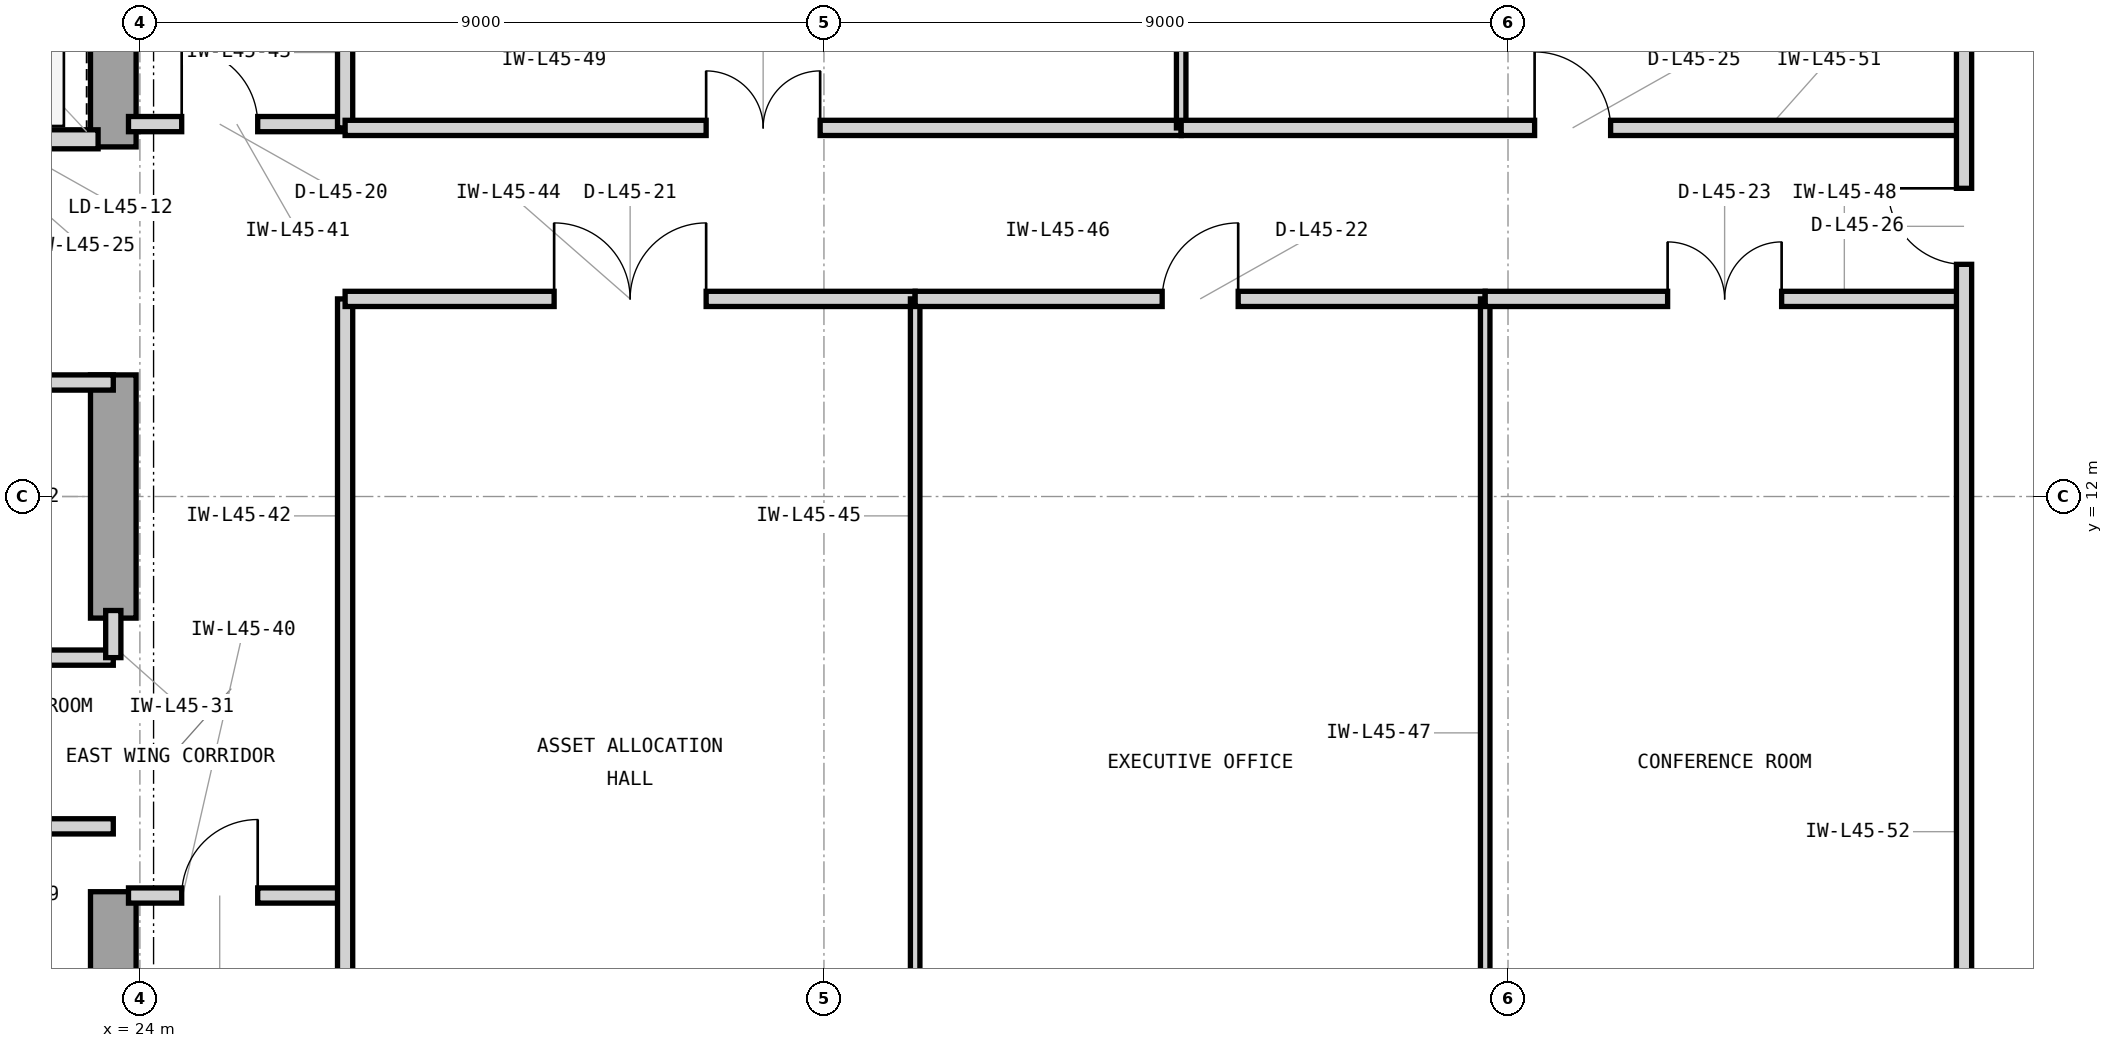
"""IFC4 building model, lengths in metres.
Left out: names, types, materials, properties, quantities, classifications, styles, units other than length and angle.
Written with IfcOpenShell. Run it as: python <this file> out.ifc"""

import sys

from ifc_helpers import new_model, si_unit, direction, frame, frame_2d, origin, place, context, subcontext, project, spatial, rectangle, extrude, element, fill, save


model = new_model("IFC4")
c1 = context("Model", 3, precision=1e-05, world=origin(), true_north=direction((0.0, 1.0)))
c2 = subcontext(c1, "Body", "Model", "MODEL_VIEW")
j1 = project(units=[si_unit("LENGTHUNIT", "METRE"), si_unit("PLANEANGLEUNIT", "RADIAN")], contexts=[c1])
p1 = place(None, origin())
s1 = spatial("IfcSite", under=j1, at=p1, CompositionType="ELEMENT")
p2 = place(p1, origin())
s2 = spatial("IfcBuilding", under=s1, at=p2, CompositionType="ELEMENT")
p3 = place(p2, frame((0.0, 0.0, 187.8)))
s3 = spatial("IfcBuildingStorey", under=s2, at=p3, CompositionType="ELEMENT", Elevation=187.8)
p4 = place(p3, frame((23.65, 3.65, 0.0), z_axis=(0.0, 0.0, 1.0), x_axis=(0.0, 1.0, 0.0)))
e1 = element("IfcWall", 1, at=p4, inside=s3, PredefinedType="SHEAR", context=c2, shape_type="SweptSolid", body=[
    extrude(rectangle(XDim=3.15, YDim=0.6, at=frame_2d((1.575, 0.0))), origin(), (0.0, 0.0, 1.0), 3.9),
])
p5 = place(p3, frame((23.65, 10.4, 0.0), z_axis=(0.0, 0.0, 1.0), x_axis=(0.0, 1.0, 0.0)))
e2 = element("IfcWall", 2, at=p5, inside=s3, PredefinedType="SHEAR", context=c2, shape_type="SweptSolid", body=[
    extrude(rectangle(XDim=3.2, YDim=0.6, at=frame_2d((1.6, 0.0))), origin(), (0.0, 0.0, 1.0), 3.9),
])
p6 = place(p3, frame((23.65, 16.6, 0.0), z_axis=(0.0, 0.0, 1.0), x_axis=(0.0, 1.0, 0.0)))
e3 = element("IfcWall", 3, at=p6, inside=s3, PredefinedType="SHEAR", context=c2, shape_type="SweptSolid", body=[
    extrude(rectangle(XDim=4.05, YDim=0.6, at=frame_2d((2.025, 0.0))), origin(), (0.0, 0.0, 1.0), 3.9),
])
p7 = place(p3, frame((21.05, 16.7, 0.0), z_axis=(0.0, 0.0, 1.0), x_axis=(1.0, 0.0, 0.0)))
e4 = element("IfcWall", 4, at=p7, inside=s3, PredefinedType="PARTITIONING", context=c2, shape_type="SweptSolid", body=[
    extrude(rectangle(XDim=2.4, YDim=0.25, at=frame_2d((1.2, 0.0))), origin(), (0.0, 0.0, 1.0), 3.283),
])
p8 = place(p7, frame((0.52, 0.0, 0.0)))
e5 = element("IfcOpeningElement", 5, at=p8, cuts=e4, PredefinedType="OPENING", context=c2, shape_type="SweptSolid", body=[
    extrude(rectangle(XDim=1.15, YDim=2.25, at=frame_2d((0.575, 1.125))), frame((0.0, 0.135, 0.0), z_axis=(0.0, -1.0, 0.0), x_axis=(1.0, 0.0, 0.0)), (0.0, 0.0, 1.0), 0.27),
])
p9 = place(p3, frame((20.85, 7.66, 0.0), z_axis=(0.0, 0.0, 1.0), x_axis=(1.0, 0.0, 0.0)))
e6 = element("IfcWall", 6, at=p9, inside=s3, PredefinedType="PARTITIONING", context=c2, shape_type="SweptSolid", body=[
    extrude(rectangle(XDim=2.8, YDim=0.2, at=frame_2d((1.4, 0.0))), origin(), (0.0, 0.0, 1.0), 3.69),
])
p10 = place(p9, frame((0.95, 0.0, 0.0)))
e7 = element("IfcOpeningElement", 7, at=p10, cuts=e6, PredefinedType="OPENING", context=c2, shape_type="SweptSolid", body=[
    extrude(rectangle(XDim=0.9, YDim=2.1, at=frame_2d((0.45, 1.05))), frame((0.0, 0.11, 0.0), z_axis=(0.0, -1.0, 0.0), x_axis=(1.0, 0.0, 0.0)), (0.0, 0.0, 1.0), 0.22),
])
p11 = place(p3, frame((14.825, 9.88, 0.0), z_axis=(0.0, 0.0, 1.0), x_axis=(1.0, 0.0, 0.0)))
e8 = element("IfcWall", 8, at=p11, inside=s3, PredefinedType="PARTITIONING", context=c2, shape_type="SweptSolid", body=[
    extrude(rectangle(XDim=8.825, YDim=0.2, at=frame_2d((4.413, 0.0))), origin(), (0.0, 0.0, 1.0), 3.69),
])
p12 = place(p3, frame((23.65, 9.88, 0.0), z_axis=(0.0, 0.0, 1.0), x_axis=(0.0, 1.0, 0.0)))
e9 = element("IfcWall", 9, at=p12, inside=s3, PredefinedType="PARTITIONING", context=c2, shape_type="SweptSolid", body=[
    extrude(rectangle(XDim=0.62, YDim=0.2, at=frame_2d((0.31, 0.0))), origin(), (0.0, 0.0, 1.0), 3.69),
])
p13 = place(p3, frame((19.9, 13.5, 0.0), z_axis=(0.0, 0.0, 1.0), x_axis=(1.0, 0.0, 0.0)))
e10 = element("IfcWall", 10, at=p13, inside=s3, PredefinedType="PARTITIONING", context=c2, shape_type="SweptSolid", body=[
    extrude(rectangle(XDim=3.75, YDim=0.2, at=frame_2d((1.875, 0.0))), origin(), (0.0, 0.0, 1.0), 3.283),
])
p14 = place(p13, frame((1.4, 0.0, 0.0)))
e11 = element("IfcOpeningElement", 11, at=p14, cuts=e10, PredefinedType="OPENING", context=c2, shape_type="SweptSolid", body=[
    extrude(rectangle(XDim=0.95, YDim=2.1, at=frame_2d((0.475, 1.05))), frame((0.0, 0.11, 0.0), z_axis=(0.0, -1.0, 0.0), x_axis=(1.0, 0.0, 0.0)), (0.0, 0.0, 1.0), 0.22),
])
p15 = place(p3, frame((23.85, 6.75, 0.0), z_axis=(0.0, 0.0, 1.0), x_axis=(1.0, 0.0, 0.0)))
e12 = element("IfcWall", 12, at=p15, inside=s3, PredefinedType="PARTITIONING", context=c2, shape_type="SweptSolid", body=[
    extrude(rectangle(XDim=2.85, YDim=0.2, at=frame_2d((1.425, 0.0))), origin(), (0.0, 0.0, 1.0), 3.69),
])
p16 = place(p15, frame((0.7, 0.0, 0.0)))
e13 = element("IfcOpeningElement", 13, at=p16, cuts=e12, PredefinedType="OPENING", context=c2, shape_type="SweptSolid", body=[
    extrude(rectangle(XDim=1.0, YDim=2.15, at=frame_2d((0.5, 1.075))), frame((0.0, 0.11, 0.0), z_axis=(0.0, -1.0, 0.0), x_axis=(1.0, 0.0, 0.0)), (0.0, 0.0, 1.0), 0.22),
])
p17 = place(p3, frame((23.85, 16.9, 0.0), z_axis=(0.0, 0.0, 1.0), x_axis=(1.0, 0.0, 0.0)))
e14 = element("IfcWall", 14, at=p17, inside=s3, PredefinedType="PARTITIONING", context=c2, shape_type="SweptSolid", body=[
    extrude(rectangle(XDim=2.85, YDim=0.2, at=frame_2d((1.425, 0.0))), origin(), (0.0, 0.0, 1.0), 3.69),
])
p18 = place(p17, frame((0.7, 0.0, 0.0)))
e15 = element("IfcOpeningElement", 15, at=p18, cuts=e14, PredefinedType="OPENING", context=c2, shape_type="SweptSolid", body=[
    extrude(rectangle(XDim=1.0, YDim=2.15, at=frame_2d((0.5, 1.075))), frame((0.0, 0.11, 0.0), z_axis=(0.0, -1.0, 0.0), x_axis=(1.0, 0.0, 0.0)), (0.0, 0.0, 1.0), 0.22),
])
p19 = place(p3, frame((26.7, 3.18, 0.0), z_axis=(0.0, 0.0, 1.0), x_axis=(0.0, 1.0, 0.0)))
e16 = element("IfcWall", 16, at=p19, inside=s3, PredefinedType="PARTITIONING", context=c2, shape_type="SweptSolid", body=[
    extrude(rectangle(XDim=11.42, YDim=0.2, at=frame_2d((5.71, 0.0))), origin(), (0.0, 0.0, 1.0), 3.69),
])
p20 = place(p3, frame((26.7, 16.85, 0.0), z_axis=(0.0, 0.0, 1.0), x_axis=(0.0, 1.0, 0.0)))
e17 = element("IfcWall", 17, at=p20, inside=s3, PredefinedType="PARTITIONING", context=c2, shape_type="SweptSolid", body=[
    extrude(rectangle(XDim=3.97, YDim=0.2, at=frame_2d((1.985, 0.0))), origin(), (0.0, 0.0, 1.0), 3.69),
])
p21 = place(p3, frame((26.7, 14.6, 0.0), z_axis=(0.0, 0.0, 1.0), x_axis=(1.0, 0.0, 0.0)))
e18 = element("IfcWall", 18, at=p21, inside=s3, PredefinedType="PARTITIONING", context=c2, shape_type="SweptSolid", body=[
    extrude(rectangle(XDim=7.5, YDim=0.2, at=frame_2d((3.75, 0.0))), origin(), (0.0, 0.0, 1.0), 3.69),
])
p22 = place(p21, frame((2.75, 0.0, 0.0)))
e19 = element("IfcOpeningElement", 19, at=p22, cuts=e18, PredefinedType="OPENING", context=c2, shape_type="SweptSolid", body=[
    extrude(rectangle(XDim=2.0, YDim=2.5, at=frame_2d((1.0, 1.25))), frame((0.0, 0.11, 0.0), z_axis=(0.0, -1.0, 0.0), x_axis=(1.0, 0.0, 0.0)), (0.0, 0.0, 1.0), 0.22),
])
p23 = place(p3, frame((34.2, 3.18, 0.0), z_axis=(0.0, 0.0, 1.0), x_axis=(0.0, 1.0, 0.0)))
e20 = element("IfcWall", 20, at=p23, inside=s3, PredefinedType="PARTITIONING", context=c2, shape_type="SweptSolid", body=[
    extrude(rectangle(XDim=11.42, YDim=0.125, at=frame_2d((5.71, 0.0))), origin(), (0.0, 0.0, 1.0), 3.69),
])
p24 = place(p3, frame((34.2, 14.6, 0.0), z_axis=(0.0, 0.0, 1.0), x_axis=(1.0, 0.0, 0.0)))
e21 = element("IfcWall", 21, at=p24, inside=s3, PredefinedType="PARTITIONING", context=c2, shape_type="SweptSolid", body=[
    extrude(rectangle(XDim=7.5, YDim=0.2, at=frame_2d((3.75, 0.0))), origin(), (0.0, 0.0, 1.0), 3.69),
])
p25 = place(p24, frame((3.25, 0.0, 0.0)))
e22 = element("IfcOpeningElement", 22, at=p25, cuts=e21, PredefinedType="OPENING", context=c2, shape_type="SweptSolid", body=[
    extrude(rectangle(XDim=1.0, YDim=2.15, at=frame_2d((0.5, 1.075))), frame((0.0, 0.11, 0.0), z_axis=(0.0, -1.0, 0.0), x_axis=(1.0, 0.0, 0.0)), (0.0, 0.0, 1.0), 0.22),
])
p26 = place(p3, frame((41.7, 3.18, 0.0), z_axis=(0.0, 0.0, 1.0), x_axis=(0.0, 1.0, 0.0)))
e23 = element("IfcWall", 23, at=p26, inside=s3, PredefinedType="PARTITIONING", context=c2, shape_type="SweptSolid", body=[
    extrude(rectangle(XDim=11.42, YDim=0.125, at=frame_2d((5.71, 0.0))), origin(), (0.0, 0.0, 1.0), 3.69),
])
p27 = place(p3, frame((41.7, 14.6, 0.0), z_axis=(0.0, 0.0, 1.0), x_axis=(1.0, 0.0, 0.0)))
e24 = element("IfcWall", 24, at=p27, inside=s3, PredefinedType="PARTITIONING", context=c2, shape_type="SweptSolid", body=[
    extrude(rectangle(XDim=6.3, YDim=0.2, at=frame_2d((3.15, 0.0))), origin(), (0.0, 0.0, 1.0), 3.69),
])
p28 = place(p27, frame((2.4, 0.0, 0.0)))
e25 = element("IfcOpeningElement", 25, at=p28, cuts=e24, PredefinedType="OPENING", context=c2, shape_type="SweptSolid", body=[
    extrude(rectangle(XDim=1.5, YDim=2.3, at=frame_2d((0.75, 1.15))), frame((0.0, 0.11, 0.0), z_axis=(0.0, -1.0, 0.0), x_axis=(1.0, 0.0, 0.0)), (0.0, 0.0, 1.0), 0.22),
])
p29 = place(p3, frame((26.7, 16.85, 0.0), z_axis=(0.0, 0.0, 1.0), x_axis=(1.0, 0.0, 0.0)))
e26 = element("IfcWall", 26, at=p29, inside=s3, PredefinedType="PARTITIONING", context=c2, shape_type="SweptSolid", body=[
    extrude(rectangle(XDim=11.0, YDim=0.2, at=frame_2d((5.5, 0.0))), origin(), (0.0, 0.0, 1.0), 3.69),
])
p30 = place(p29, frame((4.75, 0.0, 0.0)))
e27 = element("IfcOpeningElement", 27, at=p30, cuts=e26, PredefinedType="OPENING", context=c2, shape_type="SweptSolid", body=[
    extrude(rectangle(XDim=1.5, YDim=2.3, at=frame_2d((0.75, 1.15))), frame((0.0, 0.11, 0.0), z_axis=(0.0, -1.0, 0.0), x_axis=(1.0, 0.0, 0.0)), (0.0, 0.0, 1.0), 0.22),
])
p31 = place(p3, frame((37.7, 16.85, 0.0), z_axis=(0.0, 0.0, 1.0), x_axis=(0.0, 1.0, 0.0)))
e28 = element("IfcWall", 28, at=p31, inside=s3, PredefinedType="PARTITIONING", context=c2, shape_type="SweptSolid", body=[
    extrude(rectangle(XDim=3.97, YDim=0.125, at=frame_2d((1.985, 0.0))), origin(), (0.0, 0.0, 1.0), 3.69),
])
p32 = place(p3, frame((37.7, 16.85, 0.0), z_axis=(0.0, 0.0, 1.0), x_axis=(1.0, 0.0, 0.0)))
e29 = element("IfcWall", 29, at=p32, inside=s3, PredefinedType="PARTITIONING", context=c2, shape_type="SweptSolid", body=[
    extrude(rectangle(XDim=10.3, YDim=0.2, at=frame_2d((5.15, 0.0))), origin(), (0.0, 0.0, 1.0), 3.69),
])
p33 = place(p32, frame((4.65, 0.0, 0.0)))
e30 = element("IfcOpeningElement", 30, at=p33, cuts=e29, PredefinedType="OPENING", context=c2, shape_type="SweptSolid", body=[
    extrude(rectangle(XDim=1.0, YDim=2.15, at=frame_2d((0.5, 1.075))), frame((0.0, 0.11, 0.0), z_axis=(0.0, -1.0, 0.0), x_axis=(1.0, 0.0, 0.0)), (0.0, 0.0, 1.0), 0.22),
])
p34 = place(p3, frame((48.0, 3.18, 0.0), z_axis=(0.0, 0.0, 1.0), x_axis=(0.0, 1.0, 0.0)))
e31 = element("IfcWall", 31, at=p34, inside=s3, PredefinedType="PARTITIONING", context=c2, shape_type="SweptSolid", body=[
    extrude(rectangle(XDim=17.64, YDim=0.2, at=frame_2d((8.82, 0.0))), origin(), (0.0, 0.0, 1.0), 3.073),
])
p35 = place(p34, frame((11.875, 0.0, 0.0)))
e32 = element("IfcOpeningElement", 32, at=p35, cuts=e31, PredefinedType="OPENING", context=c2, shape_type="SweptSolid", body=[
    extrude(rectangle(XDim=1.0, YDim=2.15, at=frame_2d((0.5, 1.075))), frame((0.0, 0.11, 0.0), z_axis=(0.0, -1.0, 0.0), x_axis=(1.0, 0.0, 0.0)), (0.0, 0.0, 1.0), 0.22),
])
p36 = place(p16, origin())
e33 = element("IfcDoor", 33, at=p36, inside=s3, OperationType="SINGLE_SWING_RIGHT", PredefinedType="DOOR", context=c2, shape_type="SweptSolid", body=[
    extrude(rectangle(XDim=1.0, YDim=2.15, at=frame_2d((0.5, 1.075))), frame((0.0, 0.025, 0.0), z_axis=(0.0, -1.0, 0.0), x_axis=(1.0, 0.0, 0.0)), (0.0, 0.0, 1.0), 0.05),
])
fill(e13, e33)
p37 = place(p18, origin())
e34 = element("IfcDoor", 34, at=p37, inside=s3, OperationType="SINGLE_SWING_LEFT", PredefinedType="DOOR", context=c2, shape_type="SweptSolid", body=[
    extrude(rectangle(XDim=1.0, YDim=2.15, at=frame_2d((0.5, 1.075))), frame((0.0, 0.025, 0.0), z_axis=(0.0, -1.0, 0.0), x_axis=(1.0, 0.0, 0.0)), (0.0, 0.0, 1.0), 0.05),
])
fill(e15, e34)
p38 = place(p22, origin())
e35 = element("IfcDoor", 35, at=p38, inside=s3, OperationType="DOUBLE_DOOR_SINGLE_SWING", PredefinedType="DOOR", context=c2, shape_type="SweptSolid", body=[
    extrude(rectangle(XDim=2.0, YDim=2.5, at=frame_2d((1.0, 1.25))), frame((0.0, 0.025, 0.0), z_axis=(0.0, -1.0, 0.0), x_axis=(1.0, 0.0, 0.0)), (0.0, 0.0, 1.0), 0.05),
])
fill(e19, e35)
p39 = place(p25, origin())
e36 = element("IfcDoor", 36, at=p39, inside=s3, OperationType="SINGLE_SWING_RIGHT", PredefinedType="DOOR", context=c2, shape_type="SweptSolid", body=[
    extrude(rectangle(XDim=1.0, YDim=2.15, at=frame_2d((0.5, 1.075))), frame((0.0, 0.025, 0.0), z_axis=(0.0, -1.0, 0.0), x_axis=(1.0, 0.0, 0.0)), (0.0, 0.0, 1.0), 0.05),
])
fill(e22, e36)
p40 = place(p28, origin())
e37 = element("IfcDoor", 37, at=p40, inside=s3, OperationType="DOUBLE_DOOR_SINGLE_SWING", PredefinedType="DOOR", context=c2, shape_type="SweptSolid", body=[
    extrude(rectangle(XDim=1.5, YDim=2.3, at=frame_2d((0.75, 1.15))), frame((0.0, 0.025, 0.0), z_axis=(0.0, -1.0, 0.0), x_axis=(1.0, 0.0, 0.0)), (0.0, 0.0, 1.0), 0.05),
])
fill(e25, e37)
p41 = place(p30, origin())
e38 = element("IfcDoor", 38, at=p41, inside=s3, OperationType="DOUBLE_DOOR_SINGLE_SWING", PredefinedType="DOOR", context=c2, shape_type="SweptSolid", body=[
    extrude(rectangle(XDim=1.5, YDim=2.3, at=frame_2d((0.75, 1.15))), frame((0.0, 0.025, 0.0), z_axis=(0.0, -1.0, 0.0), x_axis=(1.0, 0.0, 0.0)), (0.0, 0.0, 1.0), 0.05),
])
fill(e27, e38)
p42 = place(p33, origin())
e39 = element("IfcDoor", 39, at=p42, inside=s3, OperationType="SINGLE_SWING_LEFT", PredefinedType="DOOR", context=c2, shape_type="SweptSolid", body=[
    extrude(rectangle(XDim=1.0, YDim=2.15, at=frame_2d((0.5, 1.075))), frame((0.0, 0.025, 0.0), z_axis=(0.0, -1.0, 0.0), x_axis=(1.0, 0.0, 0.0)), (0.0, 0.0, 1.0), 0.05),
])
fill(e30, e39)
p43 = place(p35, origin())
e40 = element("IfcDoor", 40, at=p43, inside=s3, OperationType="SINGLE_SWING_RIGHT", PredefinedType="DOOR", context=c2, shape_type="SweptSolid", body=[
    extrude(rectangle(XDim=1.0, YDim=2.15, at=frame_2d((0.5, 1.075))), frame((0.0, 0.025, 0.0), z_axis=(0.0, -1.0, 0.0), x_axis=(1.0, 0.0, 0.0)), (0.0, 0.0, 1.0), 0.05),
])
fill(e32, e40)
save(model, sys.argv[1])
